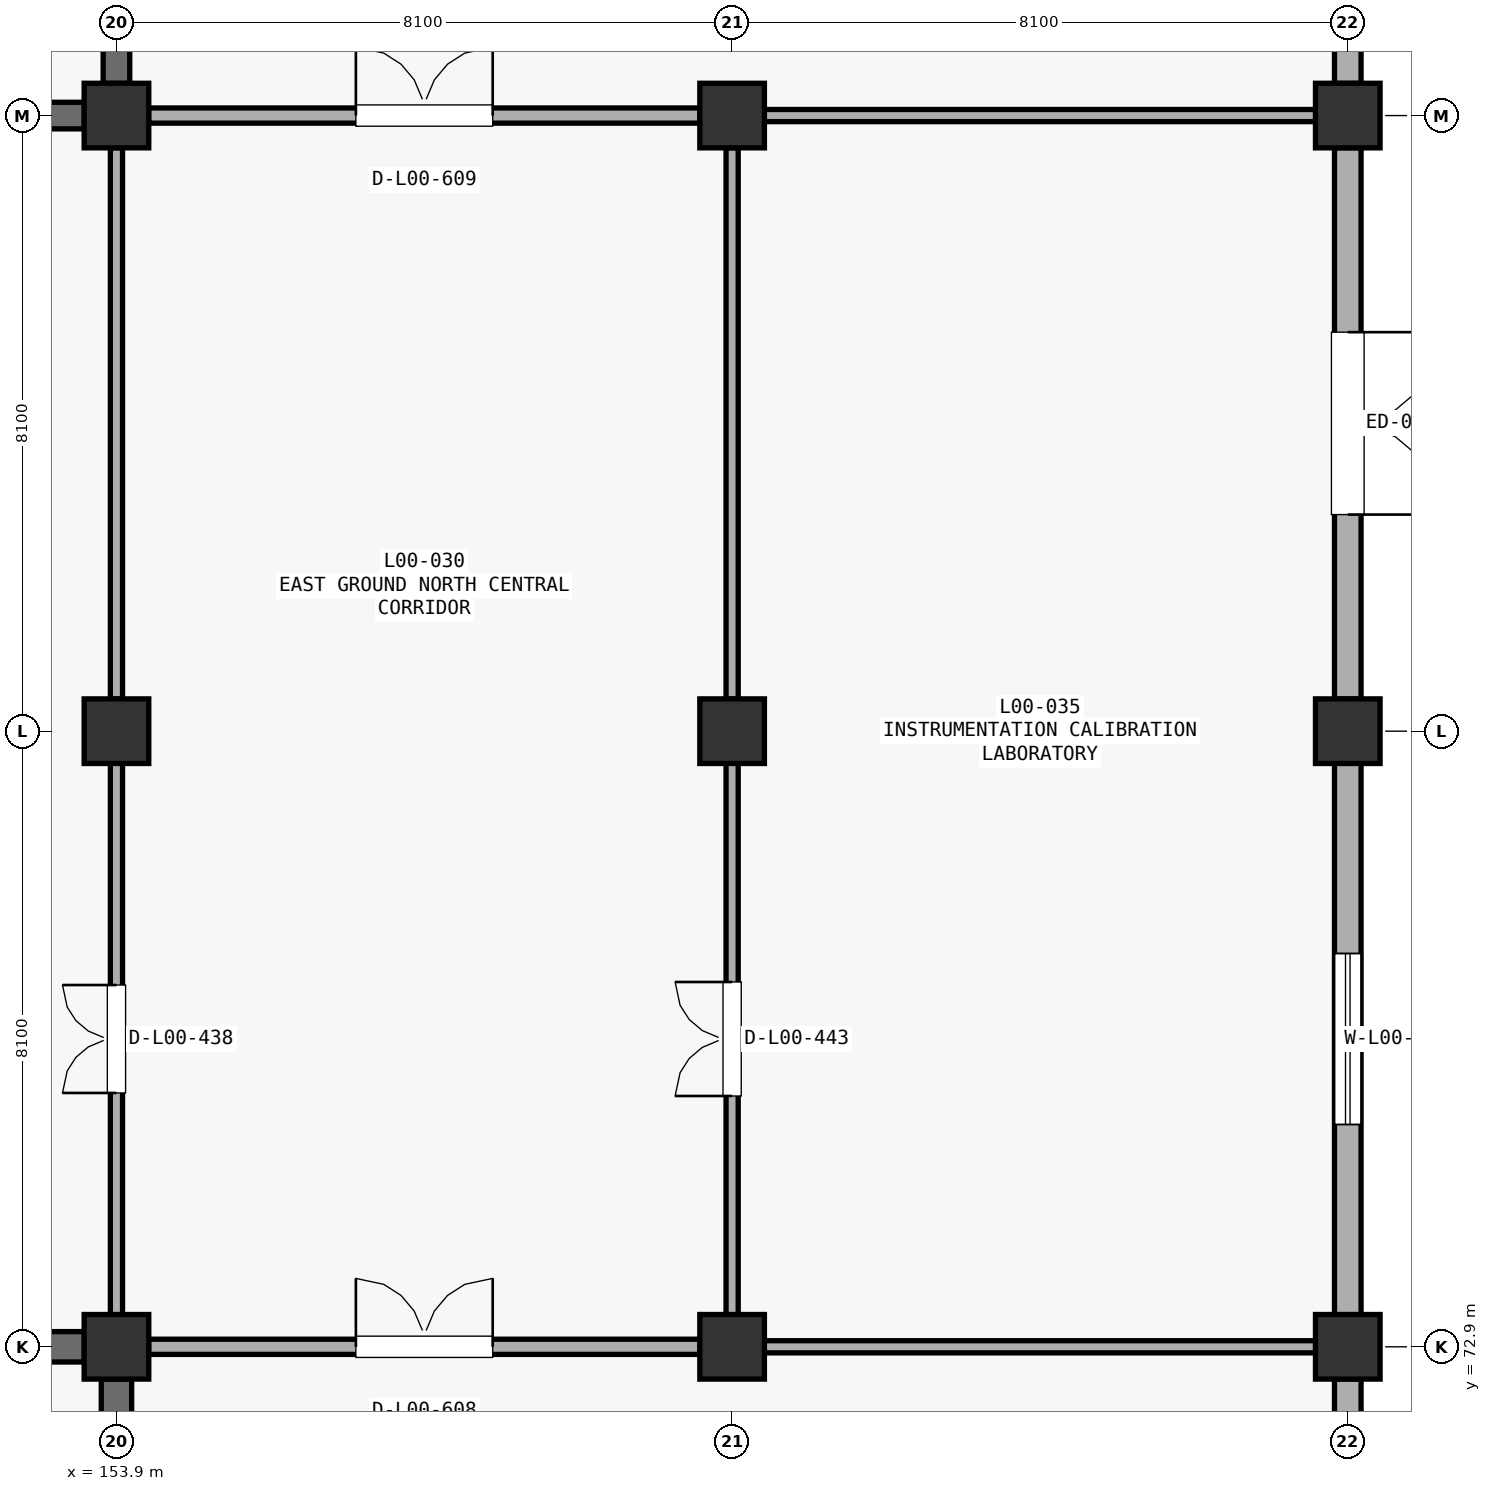
"""IFC4 building model, lengths in metres.
Left out: names, types, materials, properties, quantities, classifications, styles, units other than length and angle.
Written with IfcOpenShell. Run it as: python <this file> out.ifc"""

import sys

from ifc_helpers import new_model, si_unit, direction, frame, frame_2d, origin, origin_2d, place, context, subcontext, project, spatial, rectangle, extrude, element, fill, save


model = new_model("IFC4")
c1 = context("Model", 3, precision=1e-05, world=origin(), true_north=direction((0.0, 1.0)))
c2 = subcontext(c1, "Body", "Model", "MODEL_VIEW")
j1 = project(units=[si_unit("LENGTHUNIT", "METRE"), si_unit("PLANEANGLEUNIT", "RADIAN")], contexts=[c1])
p1 = place(None, origin())
s1 = spatial("IfcSite", under=j1, at=p1, CompositionType="ELEMENT")
p2 = place(p1, origin())
s2 = spatial("IfcBuilding", under=s1, at=p2, CompositionType="ELEMENT")
p3 = place(p2, origin())
s3 = spatial("IfcBuildingStorey", under=s2, at=p3, CompositionType="ELEMENT", Elevation=0.0)
for number, where, z_axis, x_axis in (
    (1, (153.9, 72.9, 0.0), (0.0, 0.0, 1.0), (1.0, 0.0, 0.0)),
    (2, (153.9, 81.0, 0.0), (0.0, 0.0, 1.0), (1.0, 0.0, 0.0)),
    (3, (153.9, 89.1, 0.0), (0.0, 0.0, 1.0), (1.0, 0.0, 0.0)),
    (4, (162.0, 72.9, 0.0), (0.0, 0.0, 1.0), (1.0, 0.0, 0.0)),
    (5, (162.0, 81.0, 0.0), (0.0, 0.0, 1.0), (1.0, 0.0, 0.0)),
    (6, (162.0, 89.1, 0.0), (0.0, 0.0, 1.0), (1.0, 0.0, 0.0)),
    (7, (170.1, 72.9, 0.0), (0.0, 0.0, 1.0), (1.0, 0.0, 0.0)),
    (8, (170.1, 81.0, 0.0), (0.0, 0.0, 1.0), (1.0, 0.0, 0.0)),
    (9, (170.1, 89.1, 0.0), (0.0, 0.0, 1.0), (1.0, 0.0, 0.0)),
):
    element("IfcColumn", number, at=place(p3, frame(where, z_axis=z_axis, x_axis=x_axis)), inside=s3, PredefinedType="COLUMN", context=c2, shape_type="SweptSolid", body=[
        extrude(rectangle(XDim=0.85, YDim=0.85, at=origin_2d()), origin(), (0.0, 0.0, 1.0), 5.1),
    ])
p4 = place(p3, frame((170.1, 65.223, 0.0), z_axis=(0.0, 0.0, 1.0), x_axis=(0.0, 1.0, 0.0)))
e10 = element("IfcWall", 10, at=p4, inside=s3, PredefinedType="STANDARD", context=c2, shape_type="SweptSolid", body=[
    extrude(rectangle(XDim=7.254, YDim=0.35, at=frame_2d((3.627, 0.0))), origin(), (0.0, 0.0, 1.0), 4.172),
])
p5 = place(p4, frame((4.627, 0.0, 0.0), z_axis=(0.0, 0.0, 1.0), x_axis=(-1.0, 0.0, 0.0)))
e11 = element("IfcOpeningElement", 11, at=p5, cuts=e10, PredefinedType="OPENING", context=c2, shape_type="SweptSolid", body=[
    extrude(rectangle(XDim=2.0, YDim=2.2, at=frame_2d((1.0, 1.1))), frame((0.0, 0.185, 0.0), z_axis=(0.0, -1.0, 0.0), x_axis=(1.0, 0.0, 0.0)), (0.0, 0.0, 1.0), 0.37),
])
p6 = place(p3, frame((170.1, 73.323, 0.0), z_axis=(0.0, 0.0, 1.0), x_axis=(0.0, 1.0, 0.0)))
e12 = element("IfcWall", 12, at=p6, inside=s3, PredefinedType="STANDARD", context=c2, shape_type="SweptSolid", body=[
    extrude(rectangle(XDim=7.254, YDim=0.35, at=frame_2d((3.627, 0.0))), origin(), (0.0, 0.0, 1.0), 4.222),
])
p7 = place(p6, frame((2.502, 0.0, 0.85)))
e13 = element("IfcOpeningElement", 13, at=p7, cuts=e12, PredefinedType="OPENING", context=c2, shape_type="SweptSolid", body=[
    extrude(rectangle(XDim=2.25, YDim=1.75, at=frame_2d((1.125, 0.875))), frame((0.0, 0.185, 0.0), z_axis=(0.0, -1.0, 0.0), x_axis=(1.0, 0.0, 0.0)), (0.0, 0.0, 1.0), 0.37),
])
p8 = place(p3, frame((170.1, 81.423, 0.0), z_axis=(0.0, 0.0, 1.0), x_axis=(0.0, 1.0, 0.0)))
e14 = element("IfcWall", 14, at=p8, inside=s3, PredefinedType="STANDARD", context=c2, shape_type="SweptSolid", body=[
    extrude(rectangle(XDim=7.254, YDim=0.35, at=frame_2d((3.627, 0.0))), origin(), (0.0, 0.0, 1.0), 3.972),
])
p9 = place(p8, frame((4.827, 0.0, 0.0), z_axis=(0.0, 0.0, 1.0), x_axis=(-1.0, 0.0, 0.0)))
e15 = element("IfcOpeningElement", 15, at=p9, cuts=e14, PredefinedType="OPENING", context=c2, shape_type="SweptSolid", body=[
    extrude(rectangle(XDim=2.4, YDim=2.4, at=frame_2d((1.2, 1.2))), frame((0.0, 0.185, 0.0), z_axis=(0.0, -1.0, 0.0), x_axis=(1.0, 0.0, 0.0)), (0.0, 0.0, 1.0), 0.37),
])
p10 = place(p3, frame((170.1, 89.523, 0.0), z_axis=(0.0, 0.0, 1.0), x_axis=(0.0, 1.0, 0.0)))
e16 = element("IfcWall", 16, at=p10, inside=s3, PredefinedType="STANDARD", context=c2, shape_type="SweptSolid", body=[
    extrude(rectangle(XDim=7.254, YDim=0.35, at=frame_2d((3.627, 0.0))), origin(), (0.0, 0.0, 1.0), 4.172),
])
p11 = place(p10, frame((4.627, 0.0, 0.0), z_axis=(0.0, 0.0, 1.0), x_axis=(-1.0, 0.0, 0.0)))
e17 = element("IfcOpeningElement", 17, at=p11, cuts=e16, PredefinedType="OPENING", context=c2, shape_type="SweptSolid", body=[
    extrude(rectangle(XDim=2.0, YDim=2.2, at=frame_2d((1.0, 1.1))), frame((0.0, 0.185, 0.0), z_axis=(0.0, -1.0, 0.0), x_axis=(1.0, 0.0, 0.0)), (0.0, 0.0, 1.0), 0.37),
])
p12 = place(p3, frame((146.223, 72.9, 0.0), z_axis=(0.0, 0.0, 1.0), x_axis=(1.0, 0.0, 0.0)))
e18 = element("IfcWall", 18, at=p12, inside=s3, PredefinedType="SHEAR", context=c2, shape_type="SweptSolid", body=[
    extrude(rectangle(XDim=7.254, YDim=0.4, at=frame_2d((3.627, 0.0))), origin(), (0.0, 0.0, 1.0), 4.822),
])
p13 = place(p3, frame((153.9, 65.223, 0.0), z_axis=(0.0, 0.0, 1.0), x_axis=(0.0, 1.0, 0.0)))
e19 = element("IfcWall", 19, at=p13, inside=s3, PredefinedType="SHEAR", context=c2, shape_type="SweptSolid", body=[
    extrude(rectangle(XDim=7.254, YDim=0.4, at=frame_2d((3.627, 0.0))), origin(), (0.0, 0.0, 1.0), 4.822),
])
p14 = place(p13, frame((2.75, 0.0, 0.0), z_axis=(0.0, 0.0, 1.0), x_axis=(-1.0, 0.0, 0.0)))
e20 = element("IfcOpeningElement", 20, at=p14, cuts=e19, PredefinedType="OPENING", context=c2, shape_type="SweptSolid", body=[
    extrude(rectangle(XDim=1.2, YDim=2.2, at=frame_2d((0.6, 1.1))), frame((0.0, 0.21, 0.0), z_axis=(0.0, -1.0, 0.0), x_axis=(1.0, 0.0, 0.0)), (0.0, 0.0, 1.0), 0.42),
])
p15 = place(p3, frame((153.9, 89.523, 0.0), z_axis=(0.0, 0.0, 1.0), x_axis=(0.0, 1.0, 0.0)))
e21 = element("IfcWall", 21, at=p15, inside=s3, PredefinedType="SHEAR", context=c2, shape_type="SweptSolid", body=[
    extrude(rectangle(XDim=7.254, YDim=0.35, at=frame_2d((3.627, 0.0))), origin(), (0.0, 0.0, 1.0), 4.822),
])
p16 = place(p15, frame((2.75, 0.0, 0.0), z_axis=(0.0, 0.0, 1.0), x_axis=(-1.0, 0.0, 0.0)))
e22 = element("IfcOpeningElement", 22, at=p16, cuts=e21, PredefinedType="OPENING", context=c2, shape_type="SweptSolid", body=[
    extrude(rectangle(XDim=1.2, YDim=2.2, at=frame_2d((0.6, 1.1))), frame((0.0, 0.185, 0.0), z_axis=(0.0, -1.0, 0.0), x_axis=(1.0, 0.0, 0.0)), (0.0, 0.0, 1.0), 0.37),
])
p17 = place(p3, frame((146.223, 89.1, 0.0), z_axis=(0.0, 0.0, 1.0), x_axis=(1.0, 0.0, 0.0)))
e23 = element("IfcWall", 23, at=p17, inside=s3, PredefinedType="SHEAR", context=c2, shape_type="SweptSolid", body=[
    extrude(rectangle(XDim=7.254, YDim=0.35, at=frame_2d((3.627, 0.0))), origin(), (0.0, 0.0, 1.0), 4.822),
])
p18 = place(p3, frame((153.9, 73.323, 0.0), z_axis=(0.0, 0.0, 1.0), x_axis=(0.0, 1.0, 0.0)))
e24 = element("IfcWall", 24, at=p18, inside=s3, PredefinedType="PARTITIONING", context=c2, shape_type="SweptSolid", body=[
    extrude(rectangle(XDim=7.254, YDim=0.16, at=frame_2d((3.627, 0.0))), origin(), (0.0, 0.0, 1.0), 3.972),
])
p19 = place(p18, frame((2.917, 0.0, 0.0)))
e25 = element("IfcOpeningElement", 25, at=p19, cuts=e24, PredefinedType="OPENING", context=c2, shape_type="SweptSolid", body=[
    extrude(rectangle(XDim=1.42, YDim=2.25, at=frame_2d((0.71, 1.125))), frame((0.0, 0.09, 0.0), z_axis=(0.0, -1.0, 0.0), x_axis=(1.0, 0.0, 0.0)), (0.0, 0.0, 1.0), 0.18),
])
p20 = place(p3, frame((153.9, 81.423, 0.0), z_axis=(0.0, 0.0, 1.0), x_axis=(0.0, 1.0, 0.0)))
e26 = element("IfcWall", 26, at=p20, inside=s3, PredefinedType="PARTITIONING", context=c2, shape_type="SweptSolid", body=[
    extrude(rectangle(XDim=7.254, YDim=0.16, at=frame_2d((3.627, 0.0))), origin(), (0.0, 0.0, 1.0), 3.872),
])
p21 = place(p3, frame((162.0, 73.323, 0.0), z_axis=(0.0, 0.0, 1.0), x_axis=(0.0, 1.0, 0.0)))
e27 = element("IfcWall", 27, at=p21, inside=s3, PredefinedType="PARTITIONING", context=c2, shape_type="SweptSolid", body=[
    extrude(rectangle(XDim=7.254, YDim=0.16, at=frame_2d((3.627, 0.0))), origin(), (0.0, 0.0, 1.0), 4.072),
])
p22 = place(p21, frame((2.877, 0.0, 0.0)))
e28 = element("IfcOpeningElement", 28, at=p22, cuts=e27, PredefinedType="OPENING", context=c2, shape_type="SweptSolid", body=[
    extrude(rectangle(XDim=1.5, YDim=2.2, at=frame_2d((0.75, 1.1))), frame((0.0, 0.09, 0.0), z_axis=(0.0, -1.0, 0.0), x_axis=(1.0, 0.0, 0.0)), (0.0, 0.0, 1.0), 0.18),
])
p23 = place(p3, frame((162.0, 81.423, 0.0), z_axis=(0.0, 0.0, 1.0), x_axis=(0.0, 1.0, 0.0)))
e29 = element("IfcWall", 29, at=p23, inside=s3, PredefinedType="PARTITIONING", context=c2, shape_type="SweptSolid", body=[
    extrude(rectangle(XDim=7.254, YDim=0.16, at=frame_2d((3.627, 0.0))), origin(), (0.0, 0.0, 1.0), 4.172),
])
p24 = place(p3, frame((162.423, 89.1, 0.0), z_axis=(0.0, 0.0, 1.0), x_axis=(1.0, 0.0, 0.0)))
e30 = element("IfcWall", 30, at=p24, inside=s3, PredefinedType="PARTITIONING", context=c2, shape_type="SweptSolid", body=[
    extrude(rectangle(XDim=7.254, YDim=0.16, at=frame_2d((3.627, 0.0))), origin(), (0.0, 0.0, 1.0), 4.222),
])
p25 = place(p3, frame((162.423, 72.9, 0.0), z_axis=(0.0, 0.0, 1.0), x_axis=(1.0, 0.0, 0.0)))
e31 = element("IfcWall", 31, at=p25, inside=s3, PredefinedType="PARTITIONING", context=c2, shape_type="SweptSolid", body=[
    extrude(rectangle(XDim=7.254, YDim=0.16, at=frame_2d((3.627, 0.0))), origin(), (0.0, 0.0, 1.0), 4.072),
])
p26 = place(p3, frame((154.323, 72.9, 0.0), z_axis=(0.0, 0.0, 1.0), x_axis=(1.0, 0.0, 0.0)))
e32 = element("IfcWall", 32, at=p26, inside=s3, PredefinedType="PARTITIONING", context=c2, shape_type="SweptSolid", body=[
    extrude(rectangle(XDim=7.254, YDim=0.2, at=frame_2d((3.627, 0.0))), origin(), (0.0, 0.0, 1.0), 3.872),
])
p27 = place(p26, frame((2.727, 0.0, 0.0)))
e33 = element("IfcOpeningElement", 33, at=p27, cuts=e32, PredefinedType="OPENING", context=c2, shape_type="SweptSolid", body=[
    extrude(rectangle(XDim=1.8, YDim=2.2, at=frame_2d((0.9, 1.1))), frame((0.0, 0.11, 0.0), z_axis=(0.0, -1.0, 0.0), x_axis=(1.0, 0.0, 0.0)), (0.0, 0.0, 1.0), 0.22),
])
p28 = place(p3, frame((154.323, 89.1, 0.0), z_axis=(0.0, 0.0, 1.0), x_axis=(1.0, 0.0, 0.0)))
e34 = element("IfcWall", 34, at=p28, inside=s3, PredefinedType="PARTITIONING", context=c2, shape_type="SweptSolid", body=[
    extrude(rectangle(XDim=7.254, YDim=0.2, at=frame_2d((3.627, 0.0))), origin(), (0.0, 0.0, 1.0), 4.172),
])
p29 = place(p28, frame((2.727, 0.0, 0.0)))
e35 = element("IfcOpeningElement", 35, at=p29, cuts=e34, PredefinedType="OPENING", context=c2, shape_type="SweptSolid", body=[
    extrude(rectangle(XDim=1.8, YDim=2.2, at=frame_2d((0.9, 1.1))), frame((0.0, 0.11, 0.0), z_axis=(0.0, -1.0, 0.0), x_axis=(1.0, 0.0, 0.0)), (0.0, 0.0, 1.0), 0.22),
])
p30 = place(p7, origin())
e36 = element("IfcWindow", 36, at=p30, inside=s3, PartitioningType="SINGLE_PANEL", PredefinedType="WINDOW", context=c2, shape_type="SweptSolid", body=[
    extrude(rectangle(XDim=2.25, YDim=1.75, at=frame_2d((1.125, 0.875))), frame((0.0, 0.03, 0.0), z_axis=(0.0, -1.0, 0.0), x_axis=(1.0, 0.0, 0.0)), (0.0, 0.0, 1.0), 0.06),
])
fill(e13, e36)
p31 = place(p9, origin())
e37 = element("IfcDoor", 37, at=p31, inside=s3, OperationType="DOUBLE_SWING_RIGHT", PredefinedType="DOOR", context=c2, shape_type="SweptSolid", body=[
    extrude(rectangle(XDim=2.4, YDim=2.4, at=frame_2d((1.2, 1.2))), frame((0.0, 0.025, 0.0), z_axis=(0.0, -1.0, 0.0), x_axis=(1.0, 0.0, 0.0)), (0.0, 0.0, 1.0), 0.05),
])
fill(e15, e37)
p32 = place(p19, origin())
e38 = element("IfcDoor", 38, at=p32, inside=s3, OperationType="DOUBLE_SWING_LEFT", PredefinedType="DOOR", context=c2, shape_type="SweptSolid", body=[
    extrude(rectangle(XDim=1.42, YDim=2.25, at=frame_2d((0.71, 1.125))), frame((0.0, 0.025, 0.0), z_axis=(0.0, -1.0, 0.0), x_axis=(1.0, 0.0, 0.0)), (0.0, 0.0, 1.0), 0.05),
])
fill(e25, e38)
p33 = place(p22, origin())
e39 = element("IfcDoor", 39, at=p33, inside=s3, OperationType="DOUBLE_SWING_LEFT", PredefinedType="DOOR", context=c2, shape_type="SweptSolid", body=[
    extrude(rectangle(XDim=1.5, YDim=2.2, at=frame_2d((0.75, 1.1))), frame((0.0, 0.025, 0.0), z_axis=(0.0, -1.0, 0.0), x_axis=(1.0, 0.0, 0.0)), (0.0, 0.0, 1.0), 0.05),
])
fill(e28, e39)
p34 = place(p27, origin())
e40 = element("IfcDoor", 40, at=p34, inside=s3, OperationType="DOUBLE_SWING_LEFT", PredefinedType="DOOR", context=c2, shape_type="SweptSolid", body=[
    extrude(rectangle(XDim=1.8, YDim=2.2, at=frame_2d((0.9, 1.1))), frame((0.0, 0.025, 0.0), z_axis=(0.0, -1.0, 0.0), x_axis=(1.0, 0.0, 0.0)), (0.0, 0.0, 1.0), 0.05),
])
fill(e33, e40)
p35 = place(p29, origin())
e41 = element("IfcDoor", 41, at=p35, inside=s3, OperationType="DOUBLE_SWING_LEFT", PredefinedType="DOOR", context=c2, shape_type="SweptSolid", body=[
    extrude(rectangle(XDim=1.8, YDim=2.2, at=frame_2d((0.9, 1.1))), frame((0.0, 0.025, 0.0), z_axis=(0.0, -1.0, 0.0), x_axis=(1.0, 0.0, 0.0)), (0.0, 0.0, 1.0), 0.05),
])
fill(e35, e41)
save(model, sys.argv[1])
